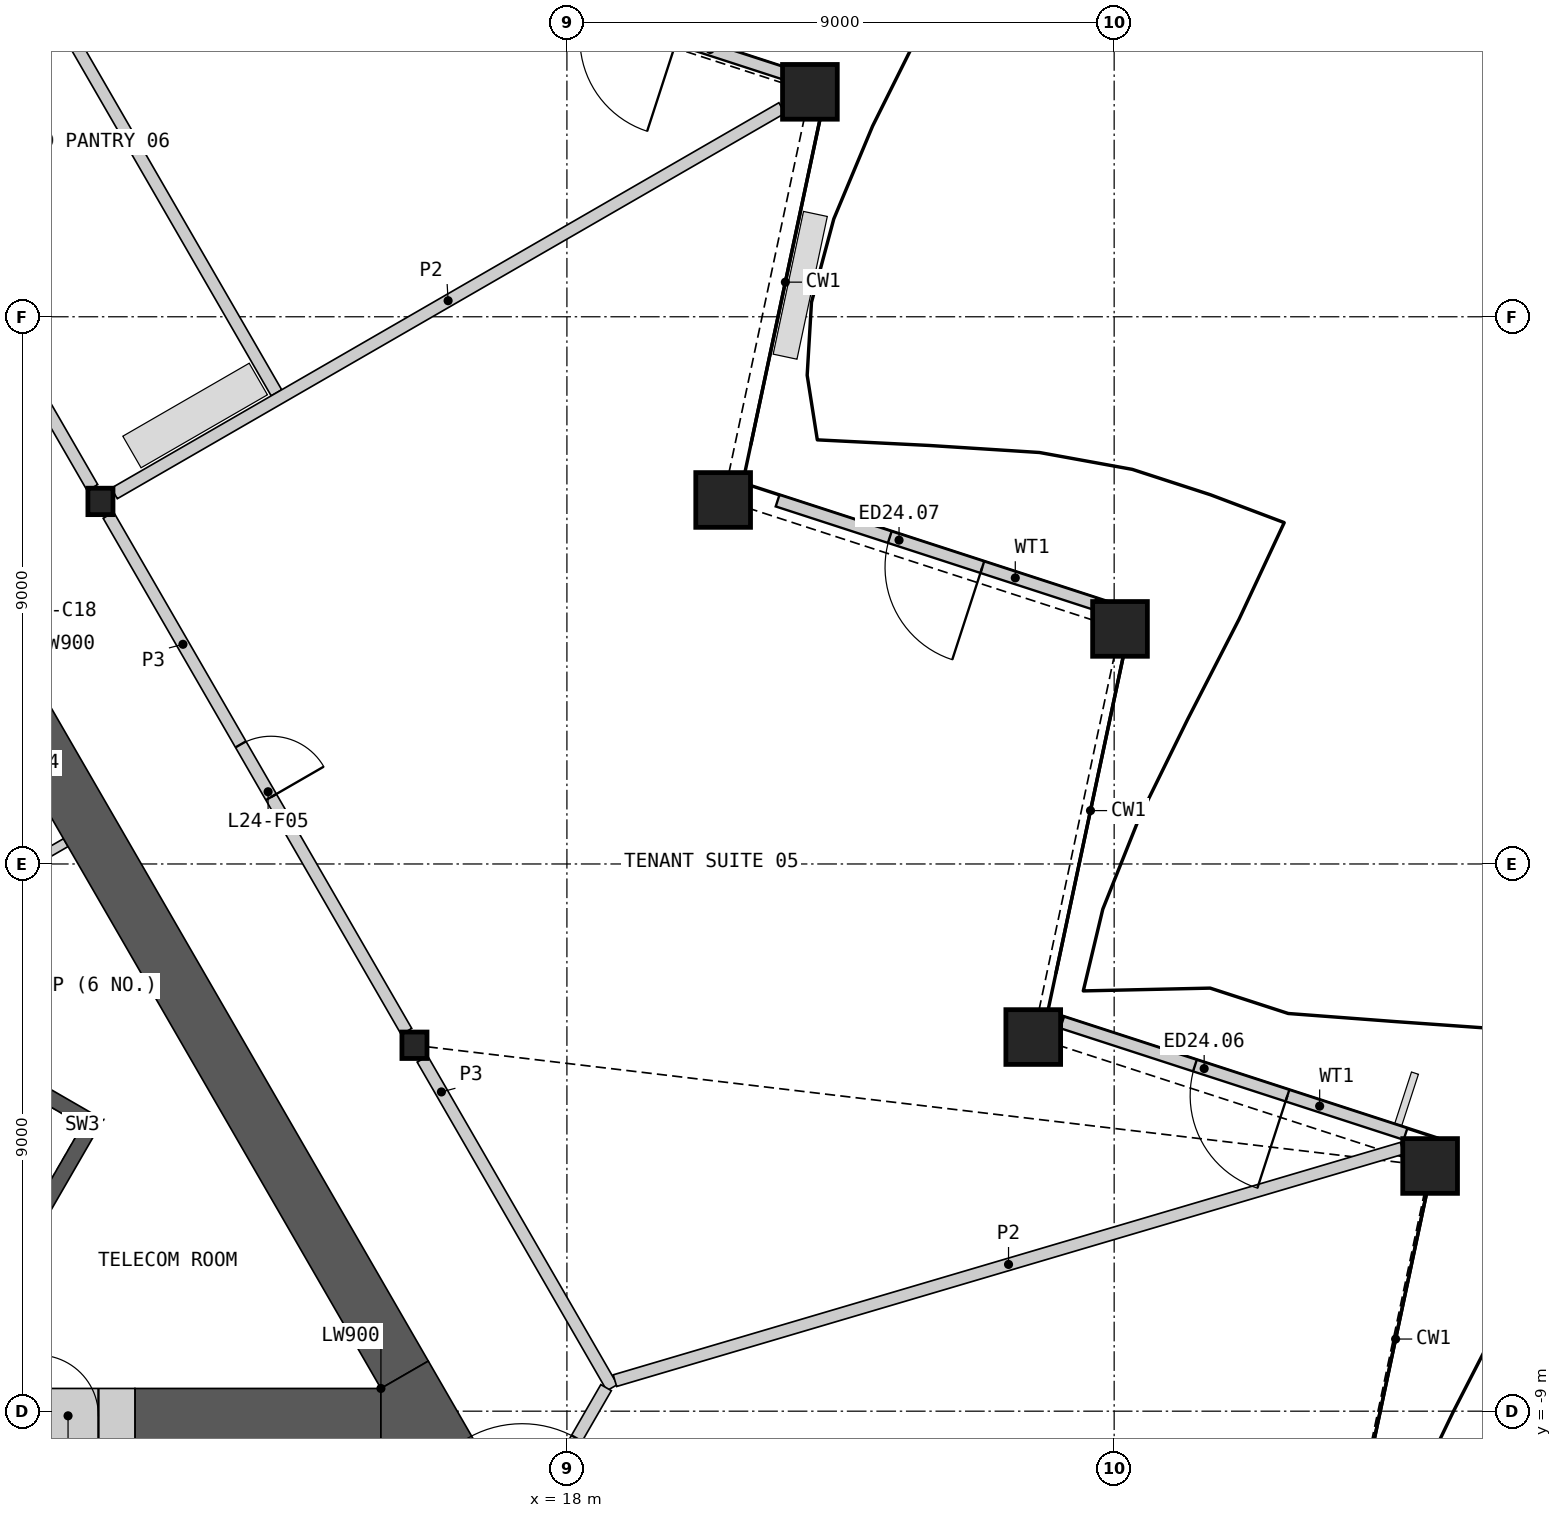
"""IFC4 building model, lengths in metres.
Left out: names, types, materials, properties, quantities, classifications, styles, units other than length and angle.
Written with IfcOpenShell. Run it as: python <this file> out.ifc"""

import sys

from ifc_helpers import new_model, si_unit, direction, frame, frame_2d, origin, origin_2d, place, context, subcontext, project, spatial, polyline, rectangle, hollow_rectangle, i_section, outline, extrude, element, fill, save


model = new_model("IFC4")
c1 = context("Model", 3, precision=1e-05, world=origin(), true_north=direction((0.0, 1.0)))
c2 = subcontext(c1, "Body", "Model", "MODEL_VIEW")
j1 = project(units=[si_unit("LENGTHUNIT", "METRE"), si_unit("PLANEANGLEUNIT", "RADIAN")], contexts=[c1])
p1 = place(None, origin())
s1 = spatial("IfcSite", under=j1, at=p1, CompositionType="ELEMENT")
p2 = place(p1, origin())
s2 = spatial("IfcBuilding", under=s1, at=p2, CompositionType="ELEMENT")
p3 = place(p2, frame((0.0, 0.0, 116.4)))
s3 = spatial("IfcBuildingStorey", under=s2, at=p3, CompositionType="ELEMENT", Elevation=116.4)
for number, where, z_axis, x_axis in (
    (1, (32.196, -4.967, 0.0), (0.0, 0.0, 1.0), (1.0, 0.0, 0.0)),
    (2, (25.669, -2.846, 0.0), (0.0, 0.0, 1.0), (1.0, 0.0, 0.0)),
    (3, (27.096, 3.866, 0.0), (0.0, 0.0, 1.0), (1.0, 0.0, 0.0)),
    (4, (20.57, 5.987, 0.0), (0.0, 0.0, 1.0), (1.0, 0.0, 0.0)),
    (5, (21.996, 12.699, 0.0), (0.0, 0.0, 1.0), (1.0, 0.0, 0.0)),
):
    element("IfcColumn", number, at=place(p3, frame(where, z_axis=z_axis, x_axis=x_axis)), inside=s3, PredefinedType="COLUMN", context=c2, shape_type="SweptSolid", body=[
        extrude(hollow_rectangle(XDim=0.9, YDim=0.9, WallThickness=0.06, at=origin_2d()), origin(), (0.0, 0.0, 1.0), 4.2),
    ])
for number, where, z_axis, x_axis in (
    (6, (15.493, -2.982, 0.0), (0.0, 0.0, 1.0), (1.0, 0.0, 0.0)),
    (7, (10.328, 5.963, 0.0), (0.0, 0.0, 1.0), (1.0, 0.0, 0.0)),
):
    element("IfcColumn", number, at=place(p3, frame(where, z_axis=z_axis, x_axis=x_axis)), inside=s3, PredefinedType="COLUMN", context=c2, shape_type="SweptSolid", body=[
        extrude(i_section(OverallWidth=0.412, OverallDepth=0.435, WebThickness=0.036, FlangeThickness=0.057, at=origin_2d()), origin(), (0.0, 0.0, 1.0), 4.2),
    ])
p4 = place(p3, frame((31.792, -4.441, 0.0), z_axis=(0.0, 0.0, 1.0), x_axis=(-0.951057028782, 0.309015417099, 0.0)))
e8 = element("IfcWall", 8, at=p4, inside=s3, PredefinedType="SOLIDWALL", context=c2, shape_type="SweptSolid", body=[
    extrude(rectangle(XDim=5.938, YDim=0.2, at=frame_2d((2.969, 0.0))), origin(), (0.0, 0.0, 1.0), 3.189),
])
p5 = place(p4, frame((2.042, 0.0, 0.0)))
e9 = element("IfcOpeningElement", 9, at=p5, cuts=e8, PredefinedType="OPENING", context=c2, shape_type="SweptSolid", body=[
    extrude(rectangle(XDim=1.6, YDim=2.4, at=frame_2d((0.8, 1.2))), frame((0.0, 0.11, 0.0), z_axis=(0.0, -1.0, 0.0), x_axis=(1.0, 0.0, 0.0)), (0.0, 0.0, 1.0), 0.22),
])
p6 = place(p3, frame((26.677, 4.282, 0.0), z_axis=(0.0, 0.0, 1.0), x_axis=(-0.951052727247, 0.309028655624, 0.0)))
e10 = element("IfcWall", 10, at=p6, inside=s3, PredefinedType="SOLIDWALL", context=c2, shape_type="SweptSolid", body=[
    extrude(rectangle(XDim=5.48, YDim=0.2, at=frame_2d((2.74, 0.0))), origin(), (0.0, 0.0, 1.0), 3.189),
])
p7 = place(p6, frame((1.94, 0.0, 0.0)))
e11 = element("IfcOpeningElement", 11, at=p7, cuts=e10, PredefinedType="OPENING", context=c2, shape_type="SweptSolid", body=[
    extrude(rectangle(XDim=1.6, YDim=2.4, at=frame_2d((0.8, 1.2))), frame((0.0, 0.11, 0.0), z_axis=(0.0, -1.0, 0.0), x_axis=(1.0, 0.0, 0.0)), (0.0, 0.0, 1.0), 0.22),
])
p8 = place(p3, frame((21.659, 12.973, 0.0), z_axis=(0.0, 0.0, 1.0), x_axis=(-0.951065819309, 0.308988361175, 0.0)))
e12 = element("IfcWall", 12, at=p8, inside=s3, PredefinedType="SOLIDWALL", context=c2, shape_type="SweptSolid", body=[
    extrude(rectangle(XDim=5.48, YDim=0.2, at=frame_2d((2.74, 0.0))), origin(), (0.0, 0.0, 1.0), 3.189),
])
p9 = place(p8, frame((1.94, 0.0, 0.0)))
e13 = element("IfcOpeningElement", 13, at=p9, cuts=e12, PredefinedType="OPENING", context=c2, shape_type="SweptSolid", body=[
    extrude(rectangle(XDim=1.6, YDim=2.4, at=frame_2d((0.8, 1.2))), frame((0.0, 0.11, 0.0), z_axis=(0.0, -1.0, 0.0), x_axis=(1.0, 0.0, 0.0)), (0.0, 0.0, 1.0), 0.22),
])
p10 = place(p3, origin())
e14 = element("IfcWall", 14, at=p10, inside=s3, PredefinedType="SHEAR", context=c2, shape_type="SweptSolid", body=[
    extrude(outline(polyline([(8.83, -6.881), (10.374, -4.206), (10.032, -4.298), (8.738, -6.539), (8.83, -6.881)])), origin(), (0.0, 0.0, 1.0), 3.8),
])
p11 = place(p3, origin())
e15 = element("IfcWall", 15, at=p11, inside=s3, PredefinedType="SHEAR", context=c2, shape_type="SweptSolid", body=[
    extrude(outline(polyline([(10.032, -4.298), (10.374, -4.206), (5.307, -1.281), (5.182, -1.498), (10.032, -4.298)])), origin(), (0.0, 0.0, 1.0), 3.8),
])
p12 = place(p3, frame((8.268, -0.509, 0.0), z_axis=(0.0, 0.0, 1.0), x_axis=(0.866024871741, 0.500000921525, 0.0)))
e16 = element("IfcWall", 16, at=p12, inside=s3, PredefinedType="PARTITIONING", context=c2, shape_type="SweptSolid", body=[
    extrude(rectangle(XDim=1.72, YDim=0.15, at=frame_2d((0.86, 0.0))), origin(), (0.0, 0.0, 1.0), 3.8),
])
p13 = place(p3, frame((10.896, -9.076, 0.0), z_axis=(0.0, 0.0, 1.0), x_axis=(1.0, 0.0, 0.0)))
e17 = element("IfcWall", 17, at=p13, inside=s3, PredefinedType="SHEAR", context=c2, shape_type="SweptSolid", body=[
    extrude(rectangle(XDim=4.046, YDim=0.9, at=frame_2d((2.023, 0.0))), origin(), (0.0, 0.0, 1.0), 3.8),
])
p14 = place(p3, frame((15.331, -8.401, 0.0), z_axis=(0.0, 0.0, 1.0), x_axis=(-0.49999216708, 0.866029926076, 0.0)))
e18 = element("IfcWall", 18, at=p14, inside=s3, PredefinedType="SHEAR", context=c2, shape_type="SweptSolid", body=[
    extrude(rectangle(XDim=12.641, YDim=0.9, at=frame_2d((6.321, 0.0))), origin(), (0.0, 0.0, 1.0), 3.8),
])
p15 = place(p3, origin())
e19 = element("IfcWall", 19, at=p15, inside=s3, PredefinedType="SHEAR", context=c2, shape_type="SweptSolid", body=[
    extrude(outline(polyline([(14.941, -8.626), (15.721, -8.176), (16.5, -9.526), (14.941, -9.526), (14.941, -8.626)])), origin(), (0.0, 0.0, 1.0), 3.8),
])
p16 = place(p3, frame((8.696, -9.076, 0.0), z_axis=(0.0, 0.0, 1.0), x_axis=(1.0, 0.0, 0.0)))
e20 = element("IfcWall", 20, at=p16, inside=s3, PredefinedType="SHEAR", context=c2, shape_type="SweptSolid", body=[
    extrude(rectangle(XDim=2.2, YDim=0.9, at=frame_2d((1.1, 0.0))), origin(), (0.0, 0.0, 1.0), 3.8),
])
p17 = place(p16, frame((0.6, 0.0, 0.0)))
e21 = element("IfcOpeningElement", 21, at=p17, cuts=e20, PredefinedType="OPENING", context=c2, shape_type="SweptSolid", body=[
    extrude(rectangle(XDim=1.0, YDim=2.1, at=frame_2d((0.5, 1.05))), frame((0.0, 0.46, 0.0), z_axis=(0.0, -1.0, 0.0), x_axis=(1.0, 0.0, 0.0)), (0.0, 0.0, 1.0), 0.92),
])
p18 = place(p3, frame((10.46, 5.736, 0.0), z_axis=(0.0, 0.0, 1.0), x_axis=(0.500004141693, -0.866023012564, 0.0)))
e22 = element("IfcWall", 22, at=p18, inside=s3, PredefinedType="PARTITIONING", context=c2, shape_type="SweptSolid", body=[
    extrude(rectangle(XDim=9.803, YDim=0.2, at=frame_2d((4.902, 0.0))), origin(), (0.0, 0.0, 1.0), 3.8),
])
p19 = place(p18, frame((4.352, 0.0, 0.0)))
e23 = element("IfcOpeningElement", 23, at=p19, cuts=e22, PredefinedType="OPENING", context=c2, shape_type="SweptSolid", body=[
    extrude(rectangle(XDim=1.0, YDim=2.1, at=frame_2d((0.5, 1.05))), frame((0.0, 0.11, 0.0), z_axis=(0.0, -1.0, 0.0), x_axis=(1.0, 0.0, 0.0)), (0.0, 0.0, 1.0), 0.22),
])
p20 = place(p3, frame((5.295, 14.68, 0.0), z_axis=(0.0, 0.0, 1.0), x_axis=(0.500012035596, -0.866018454918, 0.0)))
e24 = element("IfcWall", 24, at=p20, inside=s3, PredefinedType="PARTITIONING", context=c2, shape_type="SweptSolid", body=[
    extrude(rectangle(XDim=9.803, YDim=0.2, at=frame_2d((4.902, 0.0))), origin(), (0.0, 0.0, 1.0), 3.8),
])
p21 = place(p20, frame((4.376, 0.0, 0.0)))
e25 = element("IfcOpeningElement", 25, at=p21, cuts=e24, PredefinedType="OPENING", context=c2, shape_type="SweptSolid", body=[
    extrude(rectangle(XDim=0.95, YDim=2.1, at=frame_2d((0.475, 1.05))), frame((0.0, 0.11, 0.0), z_axis=(0.0, -1.0, 0.0), x_axis=(1.0, 0.0, 0.0)), (0.0, 0.0, 1.0), 0.22),
])
p22 = place(p3, frame((15.624, -3.209, 0.0), z_axis=(0.0, 0.0, 1.0), x_axis=(0.499997920671, -0.866026604282, 0.0)))
e26 = element("IfcWall", 26, at=p22, inside=s3, PredefinedType="PARTITIONING", context=c2, shape_type="SweptSolid", body=[
    extrude(rectangle(XDim=6.24, YDim=0.2, at=frame_2d((3.12, 0.0))), origin(), (0.0, 0.0, 1.0), 3.8),
])
p23 = place(p3, frame((16.781, -11.84, 0.0), z_axis=(0.0, 0.0, 1.0), x_axis=(0.499958791762, 0.866049194065, 0.0)))
e27 = element("IfcWall", 27, at=p23, inside=s3, PredefinedType="PARTITIONING", context=c2, shape_type="SweptSolid", body=[
    extrude(rectangle(XDim=3.726, YDim=0.2, at=frame_2d((1.863, 0.0))), origin(), (0.0, 0.0, 1.0), 3.8),
])
p24 = place(p23, frame((0.963, 0.0, 0.0)))
e28 = element("IfcOpeningElement", 28, at=p24, cuts=e27, PredefinedType="OPENING", context=c2, shape_type="SweptSolid", body=[
    extrude(rectangle(XDim=1.8, YDim=2.1, at=frame_2d((0.9, 1.05))), frame((0.0, 0.11, 0.0), z_axis=(0.0, -1.0, 0.0), x_axis=(1.0, 0.0, 0.0)), (0.0, 0.0, 1.0), 0.22),
])
p25 = place(p3, frame((4.548, 22.775, 0.0), z_axis=(0.0, 0.0, 1.0), x_axis=(0.499999764473, -0.866025539766, 0.0)))
e29 = element("IfcWall", 29, at=p25, inside=s3, PredefinedType="PARTITIONING", context=c2, shape_type="SweptSolid", body=[
    extrude(rectangle(XDim=17.35, YDim=0.2, at=frame_2d((8.675, 0.0))), origin(), (0.0, 0.0, 1.0), 2.885),
])
p26 = place(p25, frame((7.65, 0.0, 0.0)))
e30 = element("IfcOpeningElement", 30, at=p26, cuts=e29, PredefinedType="OPENING", context=c2, shape_type="SweptSolid", body=[
    extrude(rectangle(XDim=0.95, YDim=2.1, at=frame_2d((0.475, 1.05))), frame((0.0, 0.11, 0.0), z_axis=(0.0, -1.0, 0.0), x_axis=(1.0, 0.0, 0.0)), (0.0, 0.0, 1.0), 0.22),
])
p27 = place(p3, frame((18.79, -8.498, 0.0), z_axis=(0.0, 0.0, 1.0), x_axis=(0.959053889024, 0.283223653581, 0.0)))
e31 = element("IfcWall", 31, at=p27, inside=s3, PredefinedType="PARTITIONING", context=c2, shape_type="SweptSolid", body=[
    extrude(rectangle(XDim=13.499, YDim=0.2, at=frame_2d((6.75, 0.0))), origin(), (0.0, 0.0, 1.0), 2.885),
])
p28 = place(p3, frame((10.556, 6.094, 0.0), z_axis=(0.0, 0.0, 1.0), x_axis=(0.86602461759, 0.500001361726, 0.0)))
e32 = element("IfcWall", 32, at=p28, inside=s3, PredefinedType="PARTITIONING", context=c2, shape_type="SweptSolid", body=[
    extrude(rectangle(XDim=12.679, YDim=0.2, at=frame_2d((6.34, 0.0))), origin(), (0.0, 0.0, 1.0), 2.885),
])
p29 = place(p5, origin())
e33 = element("IfcDoor", 33, at=p29, inside=s3, OperationType="DOUBLE_DOOR_SINGLE_SWING", PredefinedType="DOOR", context=c2, shape_type="SweptSolid", body=[
    extrude(rectangle(XDim=1.6, YDim=2.4, at=frame_2d((0.8, 1.2))), frame((0.0, 0.025, 0.0), z_axis=(0.0, -1.0, 0.0), x_axis=(1.0, 0.0, 0.0)), (0.0, 0.0, 1.0), 0.05),
])
fill(e9, e33)
p30 = place(p7, origin())
e34 = element("IfcDoor", 34, at=p30, inside=s3, OperationType="DOUBLE_DOOR_SINGLE_SWING", PredefinedType="DOOR", context=c2, shape_type="SweptSolid", body=[
    extrude(rectangle(XDim=1.6, YDim=2.4, at=frame_2d((0.8, 1.2))), frame((0.0, 0.025, 0.0), z_axis=(0.0, -1.0, 0.0), x_axis=(1.0, 0.0, 0.0)), (0.0, 0.0, 1.0), 0.05),
])
fill(e11, e34)
p31 = place(p17, origin())
e35 = element("IfcDoor", 35, at=p31, inside=s3, OperationType="SINGLE_SWING_LEFT", PredefinedType="DOOR", context=c2, shape_type="SweptSolid", body=[
    extrude(rectangle(XDim=1.0, YDim=2.1, at=frame_2d((0.5, 1.05))), frame((0.0, 0.205, 0.0), z_axis=(0.0, -1.0, 0.0), x_axis=(1.0, 0.0, 0.0)), (0.0, 0.0, 1.0), 0.05),
])
fill(e21, e35)
p32 = place(p24, origin())
e36 = element("IfcDoor", 36, at=p32, inside=s3, OperationType="DOUBLE_DOOR_SINGLE_SWING", PredefinedType="DOOR", context=c2, shape_type="SweptSolid", body=[
    extrude(rectangle(XDim=1.8, YDim=2.1, at=frame_2d((0.9, 1.05))), frame((0.0, 0.025, 0.0), z_axis=(0.0, -1.0, 0.0), x_axis=(1.0, 0.0, 0.0)), (0.0, 0.0, 1.0), 0.05),
])
fill(e28, e36)
p33 = place(p19, origin())
e37 = element("IfcDoor", 37, at=p33, inside=s3, OperationType="SINGLE_SWING_RIGHT", PredefinedType="DOOR", context=c2, shape_type="SweptSolid", body=[
    extrude(rectangle(XDim=1.0, YDim=2.1, at=frame_2d((0.5, 1.05))), frame((0.0, 0.025, 0.0), z_axis=(0.0, -1.0, 0.0), x_axis=(1.0, 0.0, 0.0)), (0.0, 0.0, 1.0), 0.05),
])
fill(e23, e37)
save(model, sys.argv[1])
